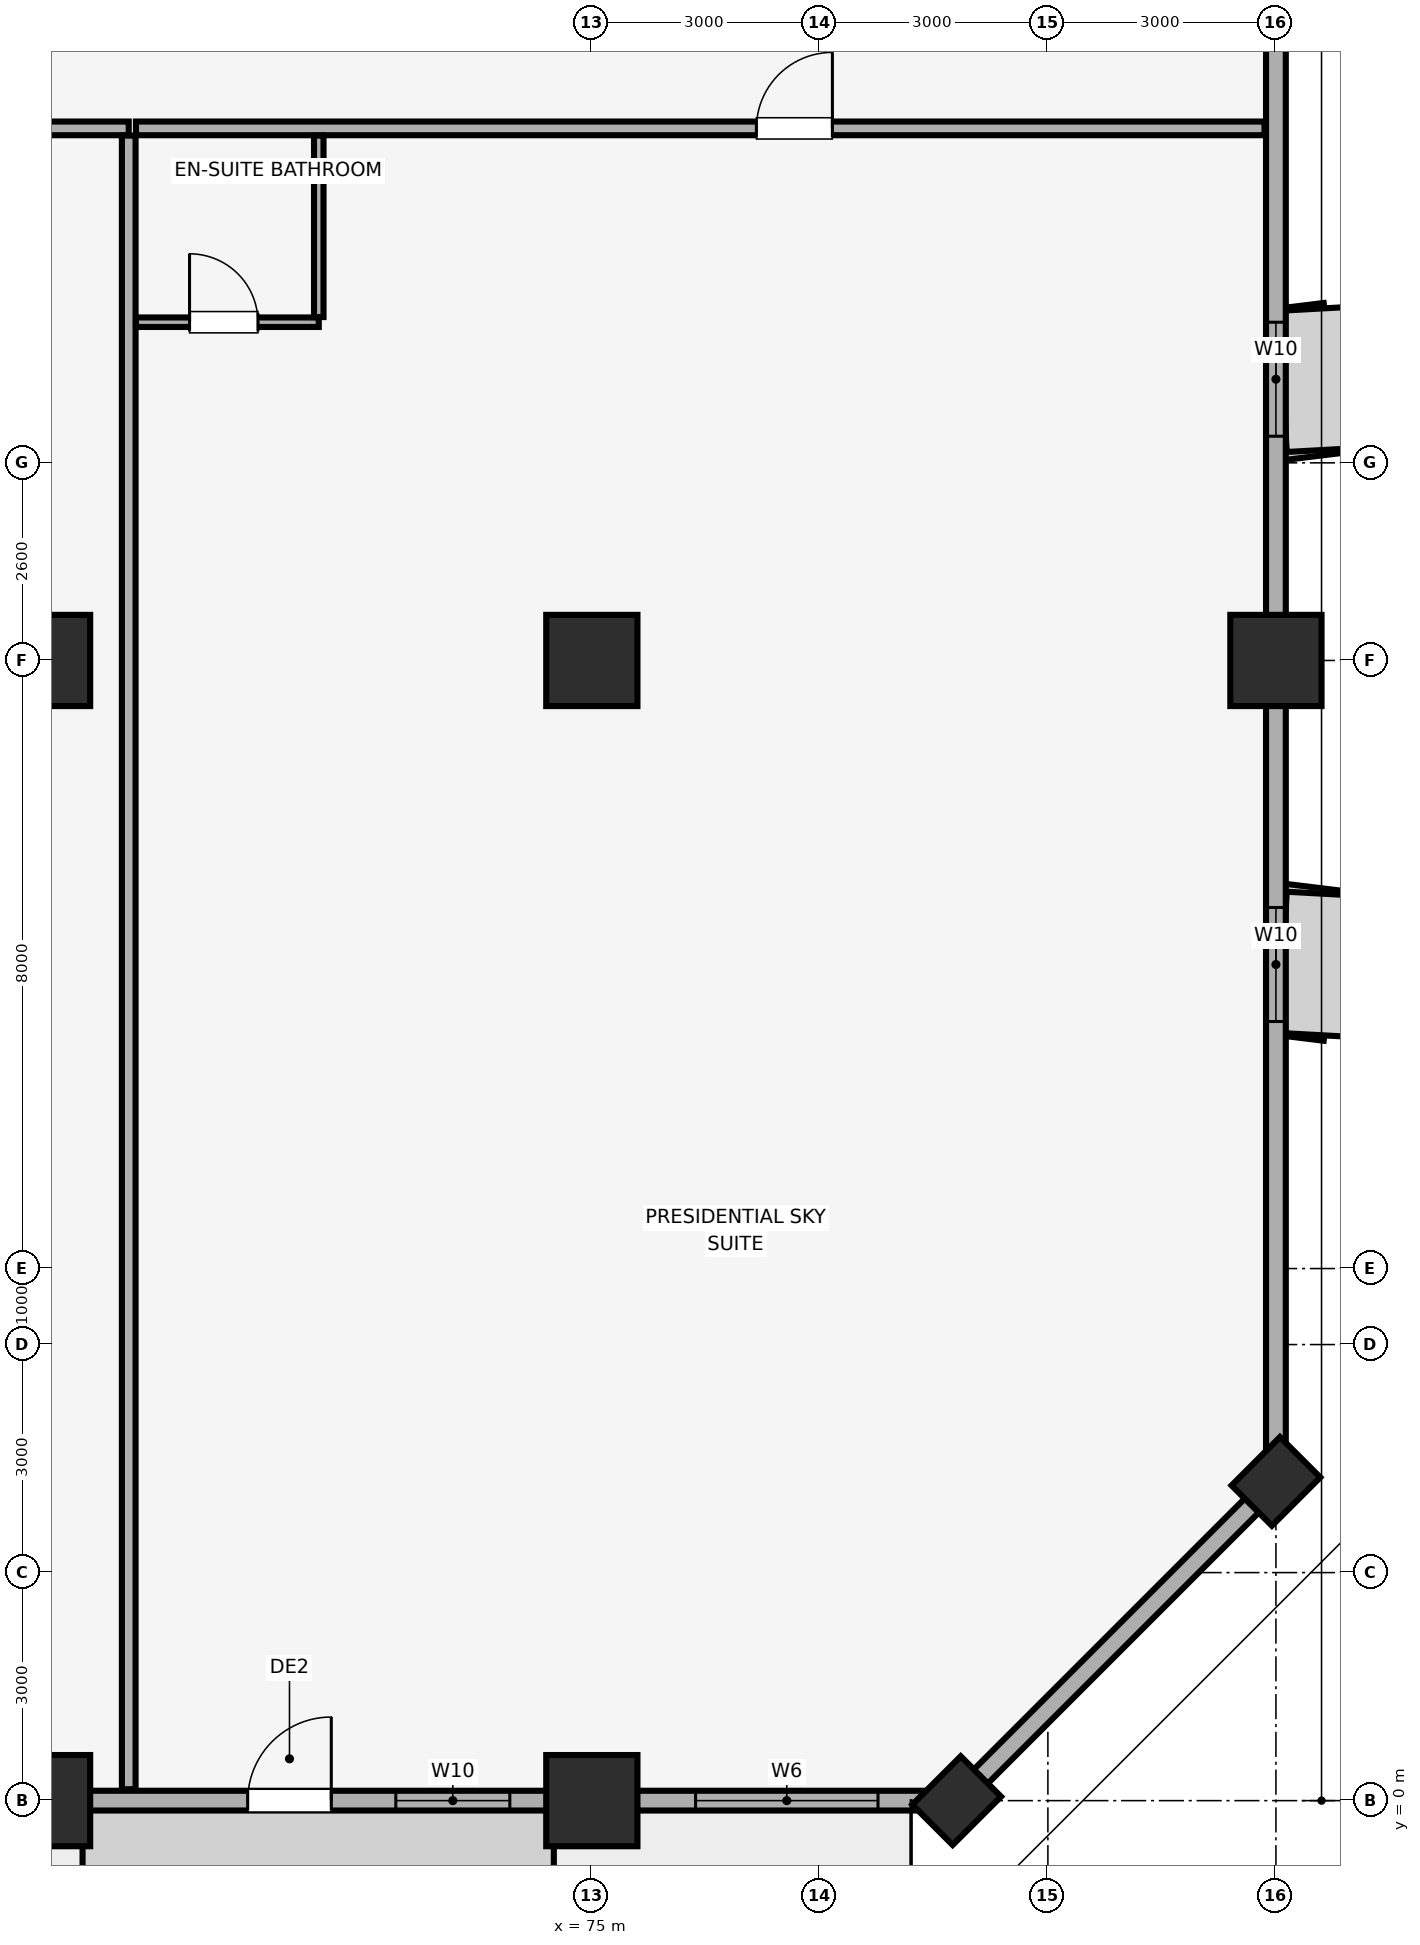
"""IFC4 building model, lengths in metres.
Left out: names, types, materials, properties, quantities, classifications, styles, units other than length and angle.
Written with IfcOpenShell. Run it as: python <this file> out.ifc"""

import sys

from ifc_helpers import new_model, si_unit, direction, frame, frame_2d, origin, origin_2d, place, context, subcontext, project, spatial, rectangle, extrude, element, fill, save


model = new_model("IFC4")
c1 = context("Model", 3, precision=1e-05, world=origin(), true_north=direction((0.0, 1.0)))
c2 = subcontext(c1, "Body", "Model", "MODEL_VIEW")
j1 = project(units=[si_unit("LENGTHUNIT", "METRE"), si_unit("PLANEANGLEUNIT", "RADIAN")], contexts=[c1])
p1 = place(None, origin())
s1 = spatial("IfcSite", under=j1, at=p1, CompositionType="ELEMENT")
p2 = place(p1, origin())
s2 = spatial("IfcBuilding", under=s1, at=p2, CompositionType="ELEMENT")
p3 = place(p2, frame((0.0, 0.0, 104.3)))
s3 = spatial("IfcBuildingStorey", under=s2, at=p3, CompositionType="ELEMENT", Elevation=104.3)
for number, where, z_axis, x_axis in (
    (1, (67.8, 0.0, 0.0), (0.0, 0.0, 1.0), (1.0, 0.0, 0.0)),
    (2, (75.0, 0.0, 0.0), (0.0, 0.0, 1.0), (1.0, 0.0, 0.0)),
    (3, (84.0, 15.0, 0.0), (0.0, 0.0, 1.0), (1.0, 0.0, 0.0)),
):
    element("IfcColumn", number, at=place(p3, frame(where, z_axis=z_axis, x_axis=x_axis)), inside=s3, PredefinedType="COLUMN", context=c2, shape_type="SweptSolid", body=[
        extrude(rectangle(XDim=1.2, YDim=1.2, at=origin_2d()), origin(), (0.0, 0.0, 1.0), 3.51),
    ])
for number, where, z_axis, x_axis in (
    (4, (79.8, 0.0, 0.0), (0.0, 0.0, 1.0), (0.707, 0.707, 0.0)),
    (5, (84.0, 4.2, 0.0), (0.0, 0.0, 1.0), (0.707, 0.707, 0.0)),
):
    element("IfcColumn", number, at=place(p3, frame(where, z_axis=z_axis, x_axis=x_axis)), inside=s3, PredefinedType="PILASTER", context=c2, shape_type="SweptSolid", body=[
        extrude(rectangle(XDim=0.9, YDim=0.75, at=origin_2d()), origin(), (0.0, 0.0, 1.0), 3.51),
    ])
for number, where, z_axis, x_axis in (
    (6, (67.8, 15.0, 0.0), (0.0, 0.0, 1.0), (1.0, 0.0, 0.0)),
    (7, (75.0, 15.0, 0.0), (0.0, 0.0, 1.0), (1.0, 0.0, 0.0)),
):
    element("IfcColumn", number, at=place(p3, frame(where, z_axis=z_axis, x_axis=x_axis)), inside=s3, PredefinedType="COLUMN", context=c2, shape_type="SweptSolid", body=[
        extrude(rectangle(XDim=1.2, YDim=1.2, at=origin_2d()), origin(), (0.0, 0.0, 1.0), 3.51),
    ])
p4 = place(p3, frame((4.2, 0.0, 0.0), z_axis=(0.0, 0.0, 1.0), x_axis=(1.0, 0.0, 0.0)))
e8 = element("IfcWall", 8, at=p4, inside=s3, PredefinedType="SOLIDWALL", context=c2, shape_type="SweptSolid", body=[
    extrude(rectangle(XDim=75.6, YDim=0.26, at=frame_2d((37.8, 0.0))), origin(), (0.0, 0.0, 1.0), 2.56),
])
p5 = place(p4, frame((22.948, 0.0, 0.0)))
e9 = element("IfcOpeningElement", 9, at=p5, cuts=e8, PredefinedType="OPENING", context=c2, shape_type="SweptSolid", body=[
    extrude(rectangle(XDim=1.1, YDim=2.15, at=frame_2d((0.55, 1.075))), frame((0.0, 0.14, 0.0), z_axis=(0.0, -1.0, 0.0), x_axis=(1.0, 0.0, 0.0)), (0.0, 0.0, 1.0), 0.28),
])
p6 = place(p4, frame((44.61, 0.0, 0.0)))
e10 = element("IfcOpeningElement", 10, at=p6, cuts=e8, PredefinedType="OPENING", context=c2, shape_type="SweptSolid", body=[
    extrude(rectangle(XDim=1.1, YDim=2.15, at=frame_2d((0.55, 1.075))), frame((0.0, 0.14, 0.0), z_axis=(0.0, -1.0, 0.0), x_axis=(1.0, 0.0, 0.0)), (0.0, 0.0, 1.0), 0.28),
])
p7 = place(p4, frame((66.272, 0.0, 0.0)))
e11 = element("IfcOpeningElement", 11, at=p7, cuts=e8, PredefinedType="OPENING", context=c2, shape_type="SweptSolid", body=[
    extrude(rectangle(XDim=1.1, YDim=2.15, at=frame_2d((0.55, 1.075))), frame((0.0, 0.14, 0.0), z_axis=(0.0, -1.0, 0.0), x_axis=(1.0, 0.0, 0.0)), (0.0, 0.0, 1.0), 0.28),
])
p8 = place(p4, frame((1.035, 0.0, 0.85)))
e12 = element("IfcOpeningElement", 12, at=p8, cuts=e8, PredefinedType="OPENING", context=c2, shape_type="SweptSolid", body=[
    extrude(rectangle(XDim=2.4, YDim=1.5, at=frame_2d((1.2, 0.75))), frame((0.0, 0.14, 0.0), z_axis=(0.0, -1.0, 0.0), x_axis=(1.0, 0.0, 0.0)), (0.0, 0.0, 1.0), 0.28),
])
p9 = place(p4, frame((6.896, 0.0, 0.85)))
e13 = element("IfcOpeningElement", 13, at=p9, cuts=e8, PredefinedType="OPENING", context=c2, shape_type="SweptSolid", body=[
    extrude(rectangle(XDim=2.4, YDim=1.5, at=frame_2d((1.2, 0.75))), frame((0.0, 0.14, 0.0), z_axis=(0.0, -1.0, 0.0), x_axis=(1.0, 0.0, 0.0)), (0.0, 0.0, 1.0), 0.28),
])
p10 = place(p4, frame((14.4, 0.0, 0.85)))
e14 = element("IfcOpeningElement", 14, at=p10, cuts=e8, PredefinedType="OPENING", context=c2, shape_type="SweptSolid", body=[
    extrude(rectangle(XDim=2.4, YDim=1.5, at=frame_2d((1.2, 0.75))), frame((0.0, 0.14, 0.0), z_axis=(0.0, -1.0, 0.0), x_axis=(1.0, 0.0, 0.0)), (0.0, 0.0, 1.0), 0.28),
])
p11 = place(p4, frame((28.439, 0.0, 0.85)))
e15 = element("IfcOpeningElement", 15, at=p11, cuts=e8, PredefinedType="OPENING", context=c2, shape_type="SweptSolid", body=[
    extrude(rectangle(XDim=2.4, YDim=1.5, at=frame_2d((1.2, 0.75))), frame((0.0, 0.14, 0.0), z_axis=(0.0, -1.0, 0.0), x_axis=(1.0, 0.0, 0.0)), (0.0, 0.0, 1.0), 0.28),
])
p12 = place(p4, frame((36.6, 0.0, 0.85)))
e16 = element("IfcOpeningElement", 16, at=p12, cuts=e8, PredefinedType="OPENING", context=c2, shape_type="SweptSolid", body=[
    extrude(rectangle(XDim=2.4, YDim=1.5, at=frame_2d((1.2, 0.75))), frame((0.0, 0.14, 0.0), z_axis=(0.0, -1.0, 0.0), x_axis=(1.0, 0.0, 0.0)), (0.0, 0.0, 1.0), 0.28),
])
p13 = place(p4, frame((46.59, 0.0, 0.85)))
e17 = element("IfcOpeningElement", 17, at=p13, cuts=e8, PredefinedType="OPENING", context=c2, shape_type="SweptSolid", body=[
    extrude(rectangle(XDim=1.5, YDim=1.4, at=frame_2d((0.75, 0.7))), frame((0.0, 0.14, 0.0), z_axis=(0.0, -1.0, 0.0), x_axis=(1.0, 0.0, 0.0)), (0.0, 0.0, 1.0), 0.28),
])
p14 = place(p4, frame((50.583, 0.0, 0.85)))
e18 = element("IfcOpeningElement", 18, at=p14, cuts=e8, PredefinedType="OPENING", context=c2, shape_type="SweptSolid", body=[
    extrude(rectangle(XDim=2.4, YDim=1.5, at=frame_2d((1.2, 0.75))), frame((0.0, 0.14, 0.0), z_axis=(0.0, -1.0, 0.0), x_axis=(1.0, 0.0, 0.0)), (0.0, 0.0, 1.0), 0.28),
])
p15 = place(p4, frame((58.8, 0.0, 0.85)))
e19 = element("IfcOpeningElement", 19, at=p15, cuts=e8, PredefinedType="OPENING", context=c2, shape_type="SweptSolid", body=[
    extrude(rectangle(XDim=2.4, YDim=1.5, at=frame_2d((1.2, 0.75))), frame((0.0, 0.14, 0.0), z_axis=(0.0, -1.0, 0.0), x_axis=(1.0, 0.0, 0.0)), (0.0, 0.0, 1.0), 0.28),
])
p16 = place(p4, frame((68.221, 0.0, 0.85)))
e20 = element("IfcOpeningElement", 20, at=p16, cuts=e8, PredefinedType="OPENING", context=c2, shape_type="SweptSolid", body=[
    extrude(rectangle(XDim=1.5, YDim=1.4, at=frame_2d((0.75, 0.7))), frame((0.0, 0.14, 0.0), z_axis=(0.0, -1.0, 0.0), x_axis=(1.0, 0.0, 0.0)), (0.0, 0.0, 1.0), 0.28),
])
p17 = place(p4, frame((72.165, 0.0, 0.85)))
e21 = element("IfcOpeningElement", 21, at=p17, cuts=e8, PredefinedType="OPENING", context=c2, shape_type="SweptSolid", body=[
    extrude(rectangle(XDim=2.4, YDim=1.5, at=frame_2d((1.2, 0.75))), frame((0.0, 0.14, 0.0), z_axis=(0.0, -1.0, 0.0), x_axis=(1.0, 0.0, 0.0)), (0.0, 0.0, 1.0), 0.28),
])
p18 = place(p3, frame((79.8, 0.0, 0.0), z_axis=(0.0, 0.0, 1.0), x_axis=(0.707106781187, 0.707106781187, 0.0)))
e22 = element("IfcWall", 22, at=p18, inside=s3, PredefinedType="SOLIDWALL", context=c2, shape_type="SweptSolid", body=[
    extrude(rectangle(XDim=5.94, YDim=0.26, at=frame_2d((2.97, 0.0))), origin(), (0.0, 0.0, 1.0), 2.56),
])
p19 = place(p3, frame((84.0, 4.2, 0.0), z_axis=(0.0, 0.0, 1.0), x_axis=(0.0, 1.0, 0.0)))
e23 = element("IfcWall", 23, at=p19, inside=s3, PredefinedType="SOLIDWALL", context=c2, shape_type="SweptSolid", body=[
    extrude(rectangle(XDim=40.6, YDim=0.26, at=frame_2d((20.3, 0.0))), origin(), (0.0, 0.0, 1.0), 2.56),
])
p20 = place(p19, frame((6.05, 0.0, 0.85)))
e24 = element("IfcOpeningElement", 24, at=p20, cuts=e23, PredefinedType="OPENING", context=c2, shape_type="SweptSolid", body=[
    extrude(rectangle(XDim=1.5, YDim=1.4, at=frame_2d((0.75, 0.7))), frame((0.0, 0.14, 0.0), z_axis=(0.0, -1.0, 0.0), x_axis=(1.0, 0.0, 0.0)), (0.0, 0.0, 1.0), 0.28),
])
p21 = place(p19, frame((13.75, 0.0, 0.85)))
e25 = element("IfcOpeningElement", 25, at=p21, cuts=e23, PredefinedType="OPENING", context=c2, shape_type="SweptSolid", body=[
    extrude(rectangle(XDim=1.5, YDim=1.4, at=frame_2d((0.75, 0.7))), frame((0.0, 0.14, 0.0), z_axis=(0.0, -1.0, 0.0), x_axis=(1.0, 0.0, 0.0)), (0.0, 0.0, 1.0), 0.28),
])
p22 = place(p19, frame((21.475, 0.0, 0.85)))
e26 = element("IfcOpeningElement", 26, at=p22, cuts=e23, PredefinedType="OPENING", context=c2, shape_type="SweptSolid", body=[
    extrude(rectangle(XDim=1.5, YDim=1.4, at=frame_2d((0.75, 0.7))), frame((0.0, 0.14, 0.0), z_axis=(0.0, -1.0, 0.0), x_axis=(1.0, 0.0, 0.0)), (0.0, 0.0, 1.0), 0.28),
])
p23 = place(p19, frame((27.85, 0.0, 0.85)))
e27 = element("IfcOpeningElement", 27, at=p23, cuts=e23, PredefinedType="OPENING", context=c2, shape_type="SweptSolid", body=[
    extrude(rectangle(XDim=1.5, YDim=1.4, at=frame_2d((0.75, 0.7))), frame((0.0, 0.14, 0.0), z_axis=(0.0, -1.0, 0.0), x_axis=(1.0, 0.0, 0.0)), (0.0, 0.0, 1.0), 0.28),
])
p24 = place(p19, frame((32.55, 0.0, 0.85)))
e28 = element("IfcOpeningElement", 28, at=p24, cuts=e23, PredefinedType="OPENING", context=c2, shape_type="SweptSolid", body=[
    extrude(rectangle(XDim=1.5, YDim=1.4, at=frame_2d((0.75, 0.7))), frame((0.0, 0.14, 0.0), z_axis=(0.0, -1.0, 0.0), x_axis=(1.0, 0.0, 0.0)), (0.0, 0.0, 1.0), 0.28),
])
p25 = place(p19, frame((37.365, 0.0, 0.85)))
e29 = element("IfcOpeningElement", 29, at=p25, cuts=e23, PredefinedType="OPENING", context=c2, shape_type="SweptSolid", body=[
    extrude(rectangle(XDim=1.5, YDim=1.4, at=frame_2d((0.75, 0.7))), frame((0.0, 0.14, 0.0), z_axis=(0.0, -1.0, 0.0), x_axis=(1.0, 0.0, 0.0)), (0.0, 0.0, 1.0), 0.28),
])
p26 = place(p3, frame((58.26, 22.0, 0.0), z_axis=(0.0, 0.0, 1.0), x_axis=(1.0, 0.0, 0.0)))
e30 = element("IfcWall", 30, at=p26, inside=s3, PredefinedType="PARTITIONING", context=c2, shape_type="SweptSolid", body=[
    extrude(rectangle(XDim=10.648, YDim=0.18, at=frame_2d((5.324, 0.0))), origin(), (0.0, 0.0, 1.0), 3.51),
])
p27 = place(p26, frame((5.533, 0.0, 0.0)))
e31 = element("IfcOpeningElement", 31, at=p27, cuts=e30, PredefinedType="OPENING", context=c2, shape_type="SweptSolid", body=[
    extrude(rectangle(XDim=1.0, YDim=2.15, at=frame_2d((0.5, 1.075))), frame((0.0, 0.1, 0.0), z_axis=(0.0, -1.0, 0.0), x_axis=(1.0, 0.0, 0.0)), (0.0, 0.0, 1.0), 0.2),
])
p28 = place(p3, frame((68.907, 0.15, 0.0), z_axis=(0.0, 0.0, 1.0), x_axis=(0.0, 1.0, 0.0)))
e32 = element("IfcWall", 32, at=p28, inside=s3, PredefinedType="PARTITIONING", context=c2, shape_type="SweptSolid", body=[
    extrude(rectangle(XDim=21.755, YDim=0.18, at=frame_2d((10.877, 0.0))), origin(), (0.0, 0.0, 1.0), 3.51),
])
p29 = place(p3, frame((69.002, 22.0, 0.0), z_axis=(0.0, 0.0, 1.0), x_axis=(1.0, 0.0, 0.0)))
e33 = element("IfcWall", 33, at=p29, inside=s3, PredefinedType="PARTITIONING", context=c2, shape_type="SweptSolid", body=[
    extrude(rectangle(XDim=14.848, YDim=0.18, at=frame_2d((7.424, 0.0))), origin(), (0.0, 0.0, 1.0), 3.51),
])
p30 = place(p29, frame((8.163, 0.0, 0.0)))
e34 = element("IfcOpeningElement", 34, at=p30, cuts=e33, PredefinedType="OPENING", context=c2, shape_type="SweptSolid", body=[
    extrude(rectangle(XDim=1.0, YDim=2.15, at=frame_2d((0.5, 1.075))), frame((0.0, 0.1, 0.0), z_axis=(0.0, -1.0, 0.0), x_axis=(1.0, 0.0, 0.0)), (0.0, 0.0, 1.0), 0.2),
])
p31 = place(p3, frame((69.002, 19.45, 0.0), z_axis=(0.0, 0.0, 1.0), x_axis=(1.0, 0.0, 0.0)))
e35 = element("IfcWall", 35, at=p31, inside=s3, PredefinedType="PARTITIONING", context=c2, shape_type="SweptSolid", body=[
    extrude(rectangle(XDim=2.405, YDim=0.125, at=frame_2d((1.203, 0.0))), origin(), (0.0, 0.0, 1.0), 3.51),
])
p32 = place(p31, frame((0.705, 0.0, 0.0)))
e36 = element("IfcOpeningElement", 36, at=p32, cuts=e35, PredefinedType="OPENING", context=c2, shape_type="SweptSolid", body=[
    extrude(rectangle(XDim=0.9, YDim=2.1, at=frame_2d((0.45, 1.05))), frame((0.0, 0.073, 0.0), z_axis=(0.0, -1.0, 0.0), x_axis=(1.0, 0.0, 0.0)), (0.0, 0.0, 1.0), 0.145),
])
p33 = place(p3, frame((71.407, 19.518, 0.0), z_axis=(0.0, 0.0, 1.0), x_axis=(0.0, 1.0, 0.0)))
e37 = element("IfcWall", 37, at=p33, inside=s3, PredefinedType="PARTITIONING", context=c2, shape_type="SweptSolid", body=[
    extrude(rectangle(XDim=2.387, YDim=0.125, at=frame_2d((1.194, 0.0))), origin(), (0.0, 0.0, 1.0), 2.977),
])
p34 = place(p7, origin())
e38 = element("IfcDoor", 38, at=p34, inside=s3, OperationType="SINGLE_SWING_RIGHT", PredefinedType="DOOR", context=c2, shape_type="SweptSolid", body=[
    extrude(rectangle(XDim=1.1, YDim=2.15, at=frame_2d((0.55, 1.075))), frame((0.0, 0.025, 0.0), z_axis=(0.0, -1.0, 0.0), x_axis=(1.0, 0.0, 0.0)), (0.0, 0.0, 1.0), 0.05),
])
fill(e11, e38)
p35 = place(p16, origin())
e39 = element("IfcWindow", 39, at=p35, inside=s3, PartitioningType="SINGLE_PANEL", PredefinedType="WINDOW", context=c2, shape_type="SweptSolid", body=[
    extrude(rectangle(XDim=1.5, YDim=1.4, at=frame_2d((0.75, 0.7))), frame((0.0, 0.03, 0.0), z_axis=(0.0, -1.0, 0.0), x_axis=(1.0, 0.0, 0.0)), (0.0, 0.0, 1.0), 0.06),
])
fill(e20, e39)
p36 = place(p17, origin())
e40 = element("IfcWindow", 40, at=p36, inside=s3, PartitioningType="SINGLE_PANEL", PredefinedType="WINDOW", context=c2, shape_type="SweptSolid", body=[
    extrude(rectangle(XDim=2.4, YDim=1.5, at=frame_2d((1.2, 0.75))), frame((0.0, 0.03, 0.0), z_axis=(0.0, -1.0, 0.0), x_axis=(1.0, 0.0, 0.0)), (0.0, 0.0, 1.0), 0.06),
])
fill(e21, e40)
p37 = place(p20, origin())
e41 = element("IfcWindow", 41, at=p37, inside=s3, PartitioningType="SINGLE_PANEL", PredefinedType="WINDOW", context=c2, shape_type="SweptSolid", body=[
    extrude(rectangle(XDim=1.5, YDim=1.4, at=frame_2d((0.75, 0.7))), frame((0.0, 0.03, 0.0), z_axis=(0.0, -1.0, 0.0), x_axis=(1.0, 0.0, 0.0)), (0.0, 0.0, 1.0), 0.06),
])
fill(e24, e41)
p38 = place(p21, origin())
e42 = element("IfcWindow", 42, at=p38, inside=s3, PartitioningType="SINGLE_PANEL", PredefinedType="WINDOW", context=c2, shape_type="SweptSolid", body=[
    extrude(rectangle(XDim=1.5, YDim=1.4, at=frame_2d((0.75, 0.7))), frame((0.0, 0.03, 0.0), z_axis=(0.0, -1.0, 0.0), x_axis=(1.0, 0.0, 0.0)), (0.0, 0.0, 1.0), 0.06),
])
fill(e25, e42)
p39 = place(p30, origin())
e43 = element("IfcDoor", 43, at=p39, inside=s3, OperationType="SINGLE_SWING_RIGHT", PredefinedType="DOOR", context=c2, shape_type="SweptSolid", body=[
    extrude(rectangle(XDim=1.0, YDim=2.15, at=frame_2d((0.5, 1.075))), frame((0.0, 0.025, 0.0), z_axis=(0.0, -1.0, 0.0), x_axis=(1.0, 0.0, 0.0)), (0.0, 0.0, 1.0), 0.05),
])
fill(e34, e43)
p40 = place(p32, origin())
e44 = element("IfcDoor", 44, at=p40, inside=s3, OperationType="SINGLE_SWING_LEFT", PredefinedType="DOOR", context=c2, shape_type="SweptSolid", body=[
    extrude(rectangle(XDim=0.9, YDim=2.1, at=frame_2d((0.45, 1.05))), frame((0.0, 0.025, 0.0), z_axis=(0.0, -1.0, 0.0), x_axis=(1.0, 0.0, 0.0)), (0.0, 0.0, 1.0), 0.05),
])
fill(e36, e44)
save(model, sys.argv[1])
